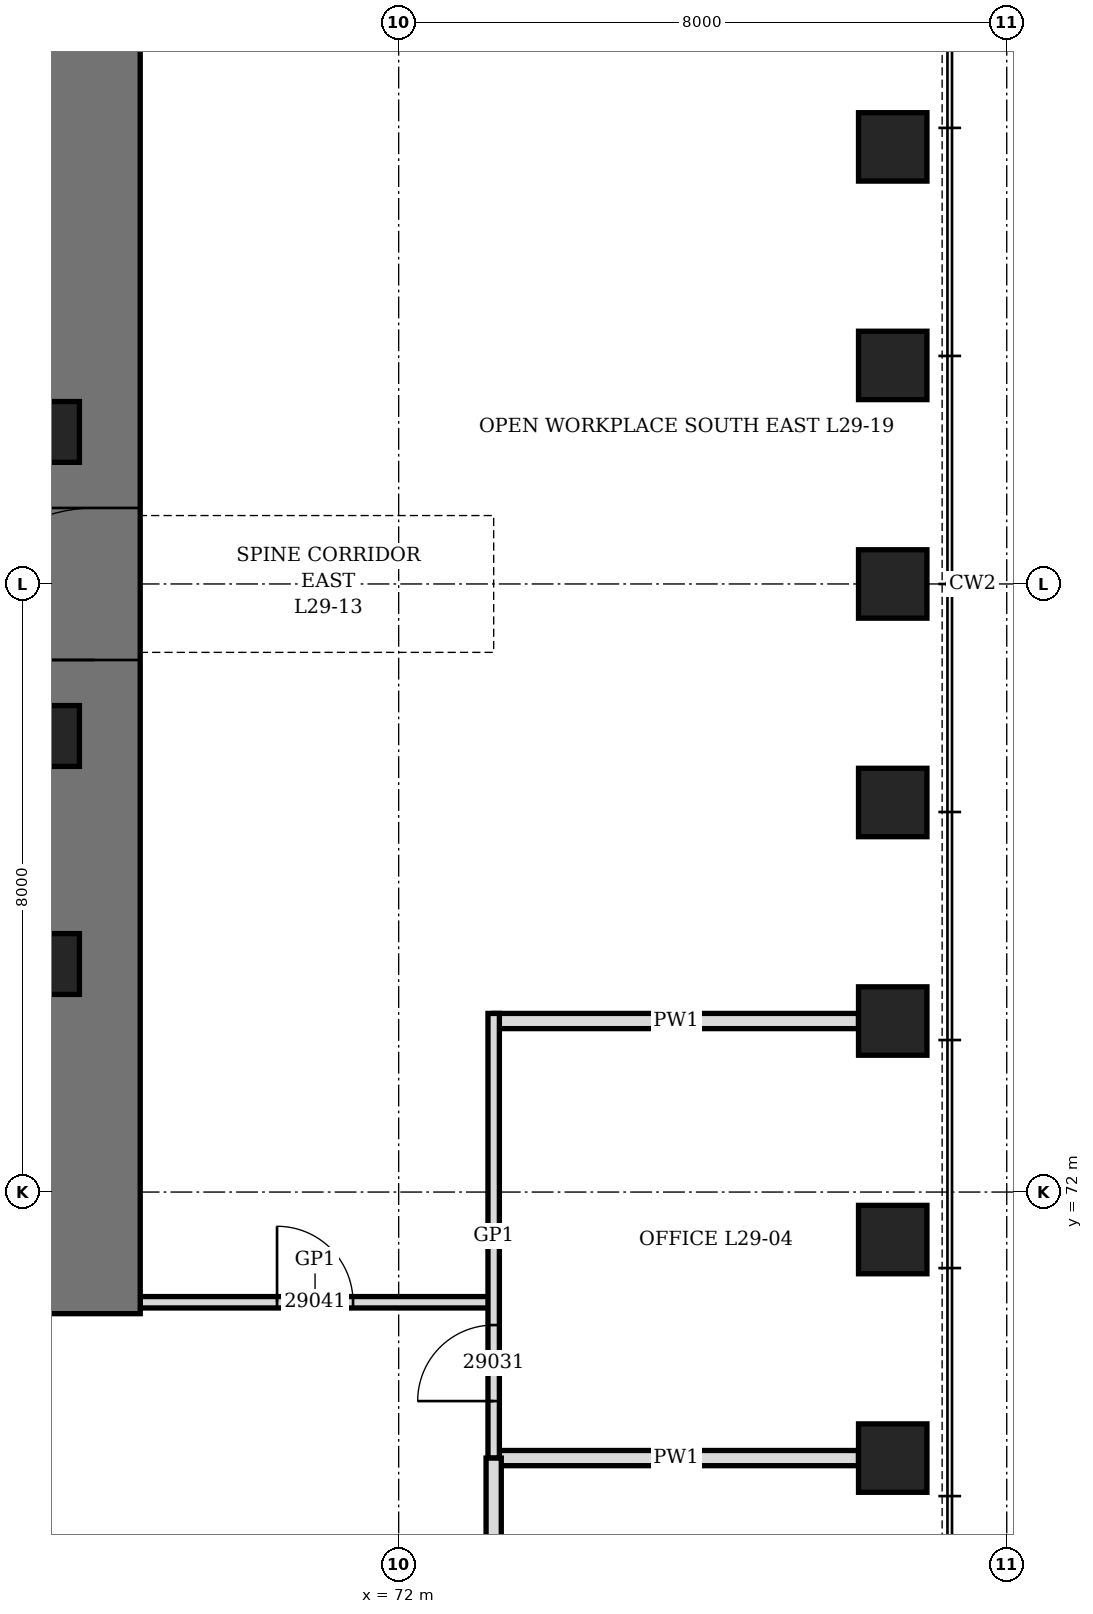
"""IFC4 building model, lengths in metres.
Left out: names, types, materials, properties, quantities, classifications, styles, units other than length and angle.
Written with IfcOpenShell. Run it as: python <this file> out.ifc"""

import sys

from ifc_helpers import new_model, si_unit, direction, frame, frame_2d, origin, origin_2d, place, context, subcontext, project, spatial, rectangle, hollow_rectangle, extrude, element, fill, save


model = new_model("IFC4")
c1 = context("Model", 3, precision=1e-05, world=origin(), true_north=direction((0.0, 1.0)))
c2 = subcontext(c1, "Body", "Model", "MODEL_VIEW")
j1 = project(units=[si_unit("LENGTHUNIT", "METRE"), si_unit("PLANEANGLEUNIT", "RADIAN")], contexts=[c1])
p1 = place(None, origin())
s1 = spatial("IfcSite", under=j1, at=p1, CompositionType="ELEMENT")
p2 = place(p1, origin())
s2 = spatial("IfcBuilding", under=s1, at=p2, CompositionType="ELEMENT")
p3 = place(p2, frame((0.0, 0.0, 133.3)))
s3 = spatial("IfcBuildingStorey", under=s2, at=p3, CompositionType="ELEMENT", Elevation=133.3)
for number, where, z_axis, x_axis in (
    (1, (78.5, 68.5, 0.0), (0.0, 0.0, 1.0), (0.0, 1.0, 0.0)),
    (2, (78.5, 71.375, 0.0), (0.0, 0.0, 1.0), (0.0, 1.0, 0.0)),
    (3, (78.5, 74.25, 0.0), (0.0, 0.0, 1.0), (0.0, 1.0, 0.0)),
    (4, (78.5, 77.125, 0.0), (0.0, 0.0, 1.0), (0.0, 1.0, 0.0)),
    (5, (78.5, 80.0, 0.0), (0.0, 0.0, 1.0), (0.0, 1.0, 0.0)),
    (6, (78.5, 82.875, 0.0), (0.0, 0.0, 1.0), (0.0, 1.0, 0.0)),
    (7, (78.5, 85.75, 0.0), (0.0, 0.0, 1.0), (0.0, 1.0, 0.0)),
):
    element("IfcColumn", number, at=place(p3, frame(where, z_axis=z_axis, x_axis=x_axis)), inside=s3, PredefinedType="COLUMN", context=c2, shape_type="SweptSolid", body=[
        extrude(hollow_rectangle(XDim=0.9, YDim=0.9, WallThickness=0.15, at=origin_2d()), origin(), (0.0, 0.0, 1.0), 4.2),
    ])
p4 = place(p3, frame((68.0, 70.4, 0.0), z_axis=(0.0, 0.0, 1.0), x_axis=(0.0, 1.0, 0.0)))
e8 = element("IfcWall", 8, at=p4, inside=s3, PredefinedType="SHEAR", context=c2, shape_type="SweptSolid", body=[
    extrude(rectangle(XDim=19.2, YDim=1.2, at=frame_2d((9.6, 0.0))), origin(), (0.0, 0.0, 1.0), 4.2),
])
p5 = place(p4, frame((8.6, 0.0, 0.0)))
e9 = element("IfcOpeningElement", 9, at=p5, cuts=e8, PredefinedType="OPENING", context=c2, shape_type="SweptSolid", body=[
    extrude(rectangle(XDim=2.0, YDim=2.4, at=frame_2d((1.0, 1.2))), frame((0.0, 0.61, 0.0), z_axis=(0.0, -1.0, 0.0), x_axis=(1.0, 0.0, 0.0)), (0.0, 0.0, 1.0), 1.22),
])
for number, where, z_axis, x_axis in (
    (10, (67.4, 75.0, 0.0), (0.0, 0.0, 1.0), (1.0, 0.0, 0.0)),
    (11, (67.4, 78.0, 0.0), (0.0, 0.0, 1.0), (1.0, 0.0, 0.0)),
    (12, (67.4, 82.0, 0.0), (0.0, 0.0, 1.0), (1.0, 0.0, 0.0)),
):
    element("IfcColumn", number, at=place(p3, frame(where, z_axis=z_axis, x_axis=x_axis)), inside=s3, PredefinedType="COLUMN", context=c2, shape_type="SweptSolid", body=[
        extrude(hollow_rectangle(XDim=0.8, YDim=0.8, WallThickness=0.1, at=origin_2d()), origin(), (0.0, 0.0, 1.0), 4.2),
    ])
for number, where, z_axis, x_axis in (
    (13, (73.25, 68.5, 0.0), (0.0, 0.0, 1.0), (1.0, 0.0, 0.0)),
    (14, (73.25, 74.25, 0.0), (0.0, 0.0, 1.0), (1.0, 0.0, 0.0)),
):
    element("IfcWall", number, at=place(p3, frame(where, z_axis=z_axis, x_axis=x_axis)), inside=s3, PredefinedType="PARTITIONING", context=c2, shape_type="SweptSolid", body=[
        extrude(rectangle(XDim=4.8, YDim=0.2, at=frame_2d((2.4, 0.0))), origin(), (0.0, 0.0, 1.0), 3.428),
    ])
p6 = place(p3, frame((68.6, 70.55, 0.0), z_axis=(0.0, 0.0, 1.0), x_axis=(1.0, 0.0, 0.0)))
e15 = element("IfcWall", 15, at=p6, inside=s3, PredefinedType="PARTITIONING", context=c2, shape_type="SweptSolid", body=[
    extrude(rectangle(XDim=4.6, YDim=0.15, at=frame_2d((2.3, 0.0))), origin(), (0.0, 0.0, 1.0), 4.04),
])
p7 = place(p6, frame((1.8, 0.0, 0.0)))
e16 = element("IfcOpeningElement", 16, at=p7, cuts=e15, PredefinedType="OPENING", context=c2, shape_type="SweptSolid", body=[
    extrude(rectangle(XDim=1.0, YDim=2.4, at=frame_2d((0.5, 1.2))), frame((0.0, 0.085, 0.0), z_axis=(0.0, -1.0, 0.0), x_axis=(1.0, 0.0, 0.0)), (0.0, 0.0, 1.0), 0.17),
])
p8 = place(p3, frame((73.25, 68.5, 0.0), z_axis=(0.0, 0.0, 1.0), x_axis=(0.0, 1.0, 0.0)))
e17 = element("IfcWall", 17, at=p8, inside=s3, PredefinedType="PARTITIONING", context=c2, shape_type="SweptSolid", body=[
    extrude(rectangle(XDim=5.85, YDim=0.15, at=frame_2d((2.925, 0.0))), origin(), (0.0, 0.0, 1.0), 4.04),
])
p9 = place(p8, frame((0.75, 0.0, 0.0)))
e18 = element("IfcOpeningElement", 18, at=p9, cuts=e17, PredefinedType="OPENING", context=c2, shape_type="SweptSolid", body=[
    extrude(rectangle(XDim=1.0, YDim=2.1, at=frame_2d((0.5, 1.05))), frame((0.0, 0.085, 0.0), z_axis=(0.0, -1.0, 0.0), x_axis=(1.0, 0.0, 0.0)), (0.0, 0.0, 1.0), 0.17),
])
p10 = place(p3, frame((73.25, 63.2, 0.0), z_axis=(0.0, 0.0, 1.0), x_axis=(0.0, 1.0, 0.0)))
e19 = element("IfcWall", 19, at=p10, inside=s3, PredefinedType="PARTITIONING", context=c2, shape_type="SweptSolid", body=[
    extrude(rectangle(XDim=5.3, YDim=0.2, at=frame_2d((2.65, 0.0))), origin(), (0.0, 0.0, 1.0), 4.04),
])
p11 = place(p10, frame((0.488, 0.0, 0.0)))
e20 = element("IfcOpeningElement", 20, at=p11, cuts=e19, PredefinedType="OPENING", context=c2, shape_type="SweptSolid", body=[
    extrude(rectangle(XDim=1.0, YDim=2.1, at=frame_2d((0.5, 1.05))), frame((0.0, 0.11, 0.0), z_axis=(0.0, -1.0, 0.0), x_axis=(1.0, 0.0, 0.0)), (0.0, 0.0, 1.0), 0.22),
])
p12 = place(p5, origin())
e21 = element("IfcDoor", 21, at=p12, inside=s3, OperationType="DOUBLE_DOOR_SINGLE_SWING", PredefinedType="DOOR", context=c2, shape_type="SweptSolid", body=[
    extrude(rectangle(XDim=2.0, YDim=2.4, at=frame_2d((1.0, 1.2))), frame((0.0, 0.35, 0.0), z_axis=(0.0, -1.0, 0.0), x_axis=(1.0, 0.0, 0.0)), (0.0, 0.0, 1.0), 0.7),
])
fill(e9, e21)
p13 = place(p9, origin())
e22 = element("IfcDoor", 22, at=p13, inside=s3, OperationType="SINGLE_SWING_LEFT", PredefinedType="DOOR", context=c2, shape_type="SweptSolid", body=[
    extrude(rectangle(XDim=1.0, YDim=2.1, at=frame_2d((0.5, 1.05))), frame((0.0, 0.075, 0.0), z_axis=(0.0, -1.0, 0.0), x_axis=(1.0, 0.0, 0.0)), (0.0, 0.0, 1.0), 0.149),
])
fill(e18, e22)
p14 = place(p7, origin())
e23 = element("IfcDoor", 23, at=p14, inside=s3, OperationType="SINGLE_SWING_RIGHT", PredefinedType="DOOR", context=c2, shape_type="SweptSolid", body=[
    extrude(rectangle(XDim=1.0, YDim=2.4, at=frame_2d((0.5, 1.2))), frame((0.0, 0.075, 0.0), z_axis=(0.0, -1.0, 0.0), x_axis=(1.0, 0.0, 0.0)), (0.0, 0.0, 1.0), 0.149),
])
fill(e16, e23)
save(model, sys.argv[1])
